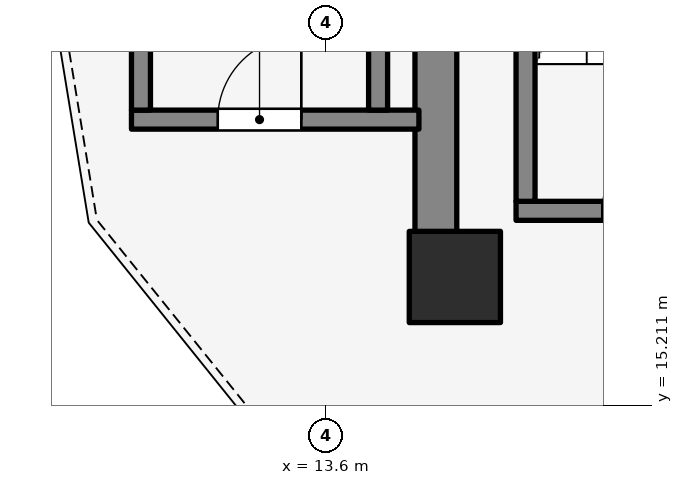
"""IFC4 building model, lengths in metres.
Left out: names, types, materials, properties, quantities, classifications, styles, units other than length and angle.
Written with IfcOpenShell. Run it as: python <this file> out.ifc"""

import sys

from ifc_helpers import new_model, si_unit, direction, frame, frame_2d, origin, origin_2d, place, context, subcontext, project, spatial, rectangle, extrude, element, fill, save


model = new_model("IFC4")
c1 = context("Model", 3, precision=1e-05, world=origin(), true_north=direction((0.0, 1.0)))
c2 = subcontext(c1, "Body", "Model", "MODEL_VIEW")
j1 = project(units=[si_unit("LENGTHUNIT", "METRE"), si_unit("PLANEANGLEUNIT", "RADIAN")], contexts=[c1])
p1 = place(None, origin())
s1 = spatial("IfcSite", under=j1, at=p1, CompositionType="ELEMENT")
p2 = place(p1, origin())
s2 = spatial("IfcBuilding", under=s1, at=p2, CompositionType="ELEMENT")
p3 = place(p2, frame((0.0, 0.0, 197.4)))
s3 = spatial("IfcBuildingStorey", under=s2, at=p3, CompositionType="ELEMENT", Elevation=197.4)
p4 = place(p3, frame((15.05, 17.05, 0.0), z_axis=(0.0, 0.0, 1.0), x_axis=(0.0, 1.0, 0.0)))
e1 = element("IfcWall", 1, at=p4, inside=s3, PredefinedType="SHEAR", context=c2, shape_type="SweptSolid", body=[
    extrude(rectangle(XDim=12.8, YDim=0.55, at=frame_2d((6.4, 0.0))), origin(), (0.0, 0.0, 1.0), 4.2),
])
p5 = place(p3, frame((16.105, 17.77, 0.0), z_axis=(0.0, 0.0, 1.0), x_axis=(1.0, 0.0, 0.0)))
e2 = element("IfcWall", 2, at=p5, inside=s3, PredefinedType="SOLIDWALL", context=c2, shape_type="SweptSolid", body=[
    extrude(rectangle(XDim=3.37, YDim=0.25, at=frame_2d((1.685, 0.0))), origin(), (0.0, 0.0, 1.0), 4.2),
])
p6 = place(p5, frame((1.135, 0.0, 0.0)))
e3 = element("IfcOpeningElement", 3, at=p6, cuts=e2, PredefinedType="OPENING", context=c2, shape_type="SweptSolid", body=[
    extrude(rectangle(XDim=1.1, YDim=2.1, at=frame_2d((0.55, 1.05))), frame((0.0, 0.135, 0.0), z_axis=(0.0, -1.0, 0.0), x_axis=(1.0, 0.0, 0.0)), (0.0, 0.0, 1.0), 0.27),
])
p7 = place(p3, frame((16.23, 17.895, 0.0), z_axis=(0.0, 0.0, 1.0), x_axis=(0.0, 1.0, 0.0)))
e4 = element("IfcWall", 4, at=p7, inside=s3, PredefinedType="SOLIDWALL", context=c2, shape_type="SweptSolid", body=[
    extrude(rectangle(XDim=7.81, YDim=0.25, at=frame_2d((3.905, 0.0))), origin(), (0.0, 0.0, 1.0), 4.2),
])
p8 = place(p3, frame((11.045, 18.97, 0.0), z_axis=(0.0, 0.0, 1.0), x_axis=(1.0, 0.0, 0.0)))
e5 = element("IfcWall", 5, at=p8, inside=s3, PredefinedType="SOLIDWALL", context=c2, shape_type="SweptSolid", body=[
    extrude(rectangle(XDim=3.782, YDim=0.25, at=frame_2d((1.891, 0.0))), origin(), (0.0, 0.0, 1.0), 4.2),
])
p9 = place(p8, frame((1.135, 0.0, 0.0)))
e6 = element("IfcOpeningElement", 6, at=p9, cuts=e5, PredefinedType="OPENING", context=c2, shape_type="SweptSolid", body=[
    extrude(rectangle(XDim=1.1, YDim=2.1, at=frame_2d((0.55, 1.05))), frame((0.0, 0.135, 0.0), z_axis=(0.0, -1.0, 0.0), x_axis=(1.0, 0.0, 0.0)), (0.0, 0.0, 1.0), 0.27),
])
for number, where, z_axis, x_axis in (
    (7, (11.17, 19.095, 0.0), (0.0, 0.0, 1.0), (0.0, 1.0, 0.0)),
    (8, (14.29, 19.095, 0.0), (0.0, 0.0, 1.0), (0.0, 1.0, 0.0)),
):
    element("IfcWall", number, at=place(p3, frame(where, z_axis=z_axis, x_axis=x_axis)), inside=s3, PredefinedType="SOLIDWALL", context=c2, shape_type="SweptSolid", body=[
        extrude(rectangle(XDim=7.81, YDim=0.25, at=frame_2d((3.905, 0.0))), origin(), (0.0, 0.0, 1.0), 4.2),
    ])
p10 = place(p3, frame((15.3, 16.9, 0.0), z_axis=(0.0, 0.0, 1.0), x_axis=(1.0, 0.0, 0.0)))
e9 = element("IfcColumn", 9, at=p10, inside=s3, PredefinedType="COLUMN", context=c2, shape_type="SweptSolid", body=[
    extrude(rectangle(XDim=1.2, YDim=1.2, at=origin_2d()), origin(), (0.0, 0.0, 1.0), 4.2),
])
p11 = place(p6, origin())
e10 = element("IfcDoor", 10, at=p11, inside=s3, OperationType="SINGLE_SWING_RIGHT", PredefinedType="DOOR", context=c2, shape_type="SweptSolid", body=[
    extrude(rectangle(XDim=1.1, YDim=2.1, at=frame_2d((0.55, 1.05))), frame((0.0, 0.025, 0.0), z_axis=(0.0, -1.0, 0.0), x_axis=(1.0, 0.0, 0.0)), (0.0, 0.0, 1.0), 0.05),
])
fill(e3, e10)
p12 = place(p9, origin())
e11 = element("IfcDoor", 11, at=p12, inside=s3, OperationType="SINGLE_SWING_RIGHT", PredefinedType="DOOR", context=c2, shape_type="SweptSolid", body=[
    extrude(rectangle(XDim=1.1, YDim=2.1, at=frame_2d((0.55, 1.05))), frame((0.0, 0.025, 0.0), z_axis=(0.0, -1.0, 0.0), x_axis=(1.0, 0.0, 0.0)), (0.0, 0.0, 1.0), 0.05),
])
fill(e6, e11)
save(model, sys.argv[1])
